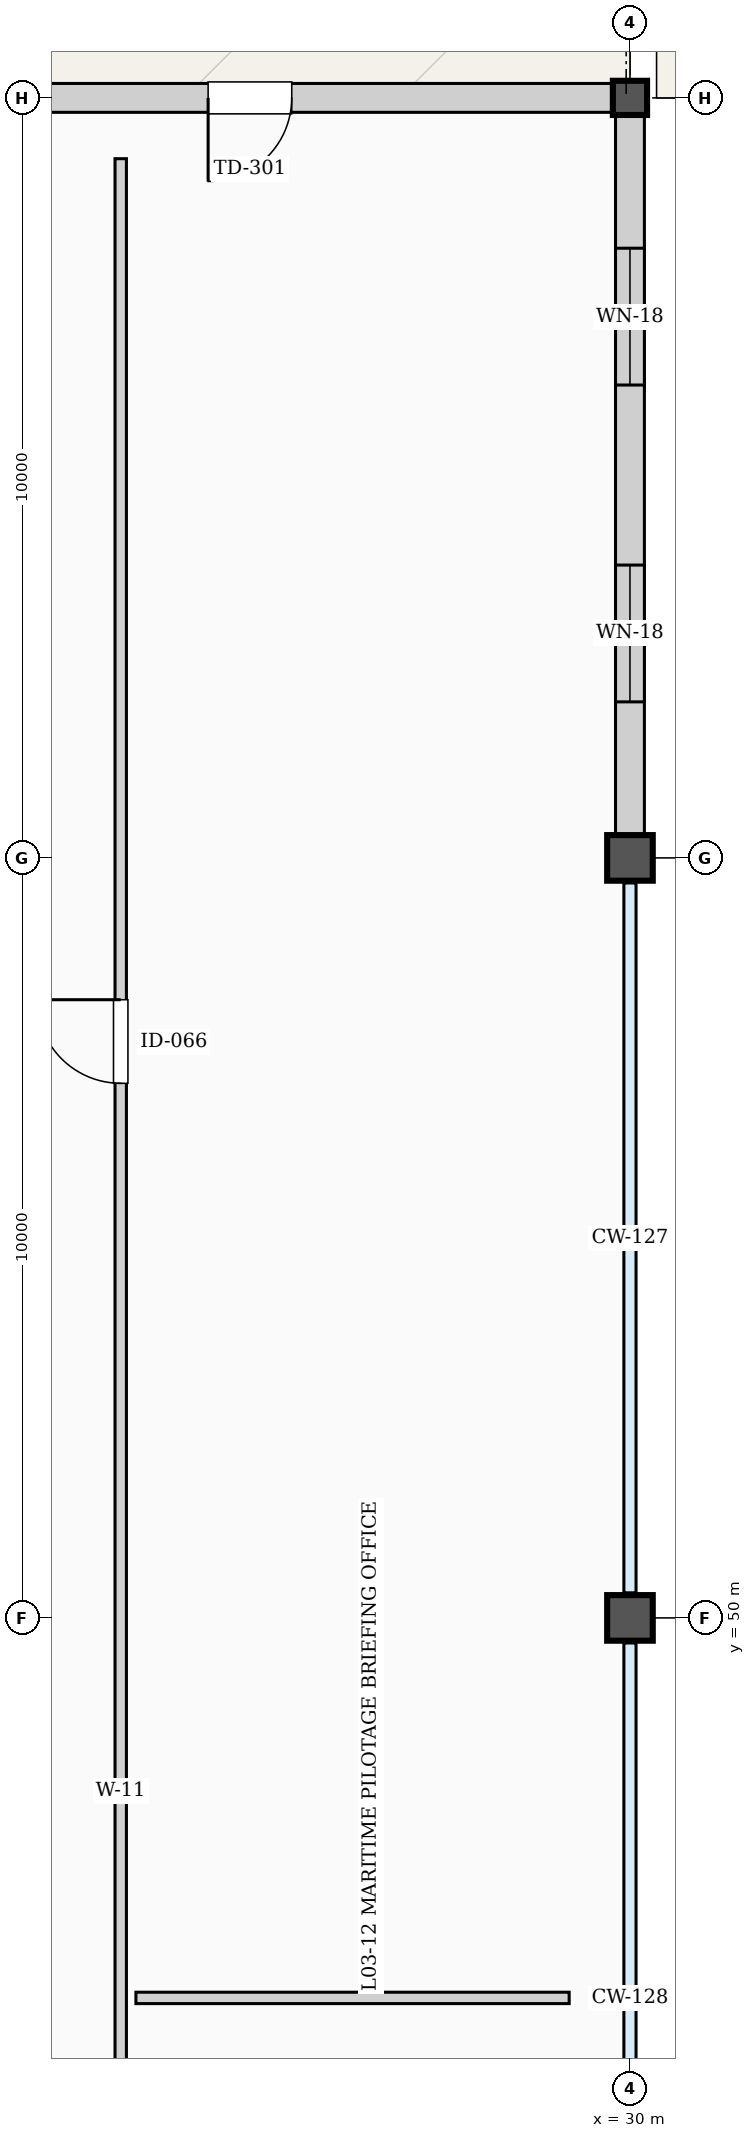
"""IFC4 building model, lengths in metres.
Left out: names, types, materials, properties, quantities, classifications, styles, units other than length and angle.
Written with IfcOpenShell. Run it as: python <this file> out.ifc"""

import sys

from ifc_helpers import new_model, si_unit, direction, frame, frame_2d, origin, origin_2d, place, context, subcontext, project, spatial, rectangle, extrude, element, fill, save


model = new_model("IFC4")
c1 = context("Model", 3, precision=1e-05, world=origin(), true_north=direction((0.0, 1.0)))
c2 = subcontext(c1, "Body", "Model", "MODEL_VIEW")
j1 = project(units=[si_unit("LENGTHUNIT", "METRE"), si_unit("PLANEANGLEUNIT", "RADIAN")], contexts=[c1])
p1 = place(None, origin())
s1 = spatial("IfcSite", under=j1, at=p1, CompositionType="ELEMENT")
p2 = place(p1, origin())
s2 = spatial("IfcBuilding", under=s1, at=p2, CompositionType="ELEMENT")
p3 = place(p2, frame((0.0, 0.0, 14.4)))
s3 = spatial("IfcBuildingStorey", under=s2, at=p3, CompositionType="ELEMENT", Elevation=14.4)
for number, where, z_axis, x_axis in (
    (1, (30.0, 50.0, 0.0), (0.0, 0.0, 1.0), (1.0, 0.0, 0.0)),
    (2, (30.0, 60.0, 0.0), (0.0, 0.0, 1.0), (1.0, 0.0, 0.0)),
):
    element("IfcColumn", number, at=place(p3, frame(where, z_axis=z_axis, x_axis=x_axis)), inside=s3, PredefinedType="COLUMN", context=c2, shape_type="SweptSolid", body=[
        extrude(rectangle(XDim=0.6, YDim=0.6, at=origin_2d()), origin(), (0.0, 0.0, 1.0), 3.9),
    ])
p4 = place(p3, frame((30.0, 70.0, 0.0), z_axis=(0.0, 0.0, 1.0), x_axis=(1.0, 0.0, 0.0)))
e3 = element("IfcColumn", 3, at=p4, inside=s3, PredefinedType="COLUMN", context=c2, shape_type="SweptSolid", body=[
    extrude(rectangle(XDim=0.45, YDim=0.45, at=origin_2d()), origin(), (0.0, 0.0, 1.0), 3.9),
])
p5 = place(p3, frame((20.225, 70.0, 0.0), z_axis=(0.0, 0.0, 1.0), x_axis=(1.0, 0.0, 0.0)))
e4 = element("IfcWall", 4, at=p5, inside=s3, PredefinedType="SOLIDWALL", context=c2, shape_type="SweptSolid", body=[
    extrude(rectangle(XDim=9.55, YDim=0.38, at=frame_2d((4.775, 0.0))), origin(), (0.0, 0.0, 1.0), 3.2),
])
p6 = place(p5, frame((4.225, 0.0, 0.0)))
e5 = element("IfcOpeningElement", 5, at=p6, cuts=e4, PredefinedType="OPENING", context=c2, shape_type="SweptSolid", body=[
    extrude(rectangle(XDim=1.1, YDim=2.35, at=frame_2d((0.55, 1.175))), frame((0.0, 0.2, 0.0), z_axis=(0.0, -1.0, 0.0), x_axis=(1.0, 0.0, 0.0)), (0.0, 0.0, 1.0), 0.4),
])
p7 = place(p3, frame((30.0, 69.775, 0.0), z_axis=(0.0, 0.0, 1.0), x_axis=(0.0, -1.0, 0.0)))
e6 = element("IfcWall", 6, at=p7, inside=s3, PredefinedType="SOLIDWALL", context=c2, shape_type="SweptSolid", body=[
    extrude(rectangle(XDim=9.475, YDim=0.38, at=frame_2d((4.737, 0.0))), origin(), (0.0, 0.0, 1.0), 3.0),
])
p8 = place(p7, frame((1.753, 0.0, 0.9)))
e7 = element("IfcOpeningElement", 7, at=p8, cuts=e6, PredefinedType="OPENING", context=c2, shape_type="SweptSolid", body=[
    extrude(rectangle(XDim=1.8, YDim=1.8, at=frame_2d((0.9, 0.9))), frame((0.0, 0.2, 0.0), z_axis=(0.0, -1.0, 0.0), x_axis=(1.0, 0.0, 0.0)), (0.0, 0.0, 1.0), 0.4),
])
p9 = place(p7, frame((5.922, 0.0, 0.9)))
e8 = element("IfcOpeningElement", 8, at=p9, cuts=e6, PredefinedType="OPENING", context=c2, shape_type="SweptSolid", body=[
    extrude(rectangle(XDim=1.8, YDim=1.8, at=frame_2d((0.9, 0.9))), frame((0.0, 0.2, 0.0), z_axis=(0.0, -1.0, 0.0), x_axis=(1.0, 0.0, 0.0)), (0.0, 0.0, 1.0), 0.4),
])
p10 = place(p3, frame((23.3, 20.8, 0.0), z_axis=(0.0, 0.0, 1.0), x_axis=(0.0, 1.0, 0.0)))
e9 = element("IfcWall", 9, at=p10, inside=s3, PredefinedType="PARTITIONING", context=c2, shape_type="SweptSolid", body=[
    extrude(rectangle(XDim=48.4, YDim=0.15, at=frame_2d((24.2, 0.0))), origin(), (0.0, 0.0, 1.0), 3.26),
])
p11 = place(p10, frame((13.002, 0.0, 0.0)))
e10 = element("IfcOpeningElement", 10, at=p11, cuts=e9, PredefinedType="OPENING", context=c2, shape_type="SweptSolid", body=[
    extrude(rectangle(XDim=1.1, YDim=2.3, at=frame_2d((0.55, 1.15))), frame((0.0, 0.085, 0.0), z_axis=(0.0, -1.0, 0.0), x_axis=(1.0, 0.0, 0.0)), (0.0, 0.0, 1.0), 0.17),
])
p12 = place(p10, frame((36.234, 0.0, 0.0)))
e11 = element("IfcOpeningElement", 11, at=p12, cuts=e9, PredefinedType="OPENING", context=c2, shape_type="SweptSolid", body=[
    extrude(rectangle(XDim=1.1, YDim=2.3, at=frame_2d((0.55, 1.15))), frame((0.0, 0.085, 0.0), z_axis=(0.0, -1.0, 0.0), x_axis=(1.0, 0.0, 0.0)), (0.0, 0.0, 1.0), 0.17),
])
p13 = place(p3, frame((23.5, 45.0, 0.0), z_axis=(0.0, 0.0, 1.0), x_axis=(1.0, 0.0, 0.0)))
e12 = element("IfcWall", 12, at=p13, inside=s3, PredefinedType="PARTITIONING", context=c2, shape_type="SweptSolid", body=[
    extrude(rectangle(XDim=5.7, YDim=0.15, at=frame_2d((2.85, 0.0))), origin(), (0.0, 0.0, 1.0), 3.56),
])
p14 = place(p6, origin())
e13 = element("IfcDoor", 13, at=p14, inside=s3, OperationType="SINGLE_SWING_LEFT", PredefinedType="DOOR", context=c2, shape_type="SweptSolid", body=[
    extrude(rectangle(XDim=1.1, YDim=2.35, at=frame_2d((0.55, 1.175))), frame((0.0, 0.025, 0.0), z_axis=(0.0, -1.0, 0.0), x_axis=(1.0, 0.0, 0.0)), (0.0, 0.0, 1.0), 0.05),
])
fill(e5, e13)
p15 = place(p8, origin())
e14 = element("IfcWindow", 14, at=p15, inside=s3, PartitioningType="SINGLE_PANEL", PredefinedType="WINDOW", context=c2, shape_type="SweptSolid", body=[
    extrude(rectangle(XDim=1.8, YDim=1.8, at=frame_2d((0.9, 0.9))), frame((0.0, 0.03, 0.0), z_axis=(0.0, -1.0, 0.0), x_axis=(1.0, 0.0, 0.0)), (0.0, 0.0, 1.0), 0.06),
])
fill(e7, e14)
p16 = place(p9, origin())
e15 = element("IfcWindow", 15, at=p16, inside=s3, PartitioningType="SINGLE_PANEL", PredefinedType="WINDOW", context=c2, shape_type="SweptSolid", body=[
    extrude(rectangle(XDim=1.8, YDim=1.8, at=frame_2d((0.9, 0.9))), frame((0.0, 0.03, 0.0), z_axis=(0.0, -1.0, 0.0), x_axis=(1.0, 0.0, 0.0)), (0.0, 0.0, 1.0), 0.06),
])
fill(e8, e15)
p17 = place(p12, origin())
e16 = element("IfcDoor", 16, at=p17, inside=s3, OperationType="SINGLE_SWING_RIGHT", PredefinedType="DOOR", context=c2, shape_type="SweptSolid", body=[
    extrude(rectangle(XDim=1.1, YDim=2.3, at=frame_2d((0.55, 1.15))), frame((0.0, 0.025, 0.0), z_axis=(0.0, -1.0, 0.0), x_axis=(1.0, 0.0, 0.0)), (0.0, 0.0, 1.0), 0.05),
])
fill(e11, e16)
save(model, sys.argv[1])
